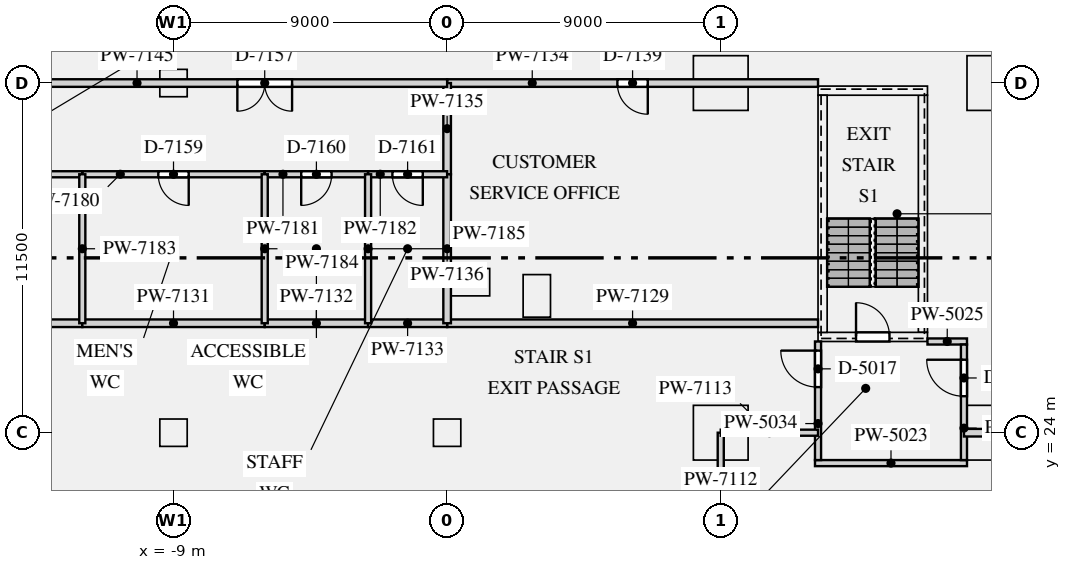
"""IFC4 building model, lengths in metres.
Left out: names, types, materials, properties, quantities, classifications, styles, units other than length and angle.
Written with IfcOpenShell. Run it as: python <this file> out.ifc"""

import sys

from ifc_helpers import new_model, si_unit, direction, frame, frame_2d, origin, origin_2d, place, context, subcontext, project, spatial, rectangle, extrude, element, fill, save


model = new_model("IFC4")
c1 = context("Model", 3, precision=1e-05, world=origin(), true_north=direction((0.0, 1.0)))
c2 = subcontext(c1, "Body", "Model", "MODEL_VIEW")
j1 = project(units=[si_unit("LENGTHUNIT", "METRE"), si_unit("PLANEANGLEUNIT", "RADIAN")], contexts=[c1])
p1 = place(None, origin())
s1 = spatial("IfcSite", under=j1, at=p1, CompositionType="ELEMENT")
p2 = place(p1, origin())
s2 = spatial("IfcBuilding", under=s1, at=p2, CompositionType="ELEMENT")
p3 = place(p2, origin())
s3 = spatial("IfcBuildingStorey", under=s2, at=p3, CompositionType="ELEMENT", Elevation=0.0)
for number, where, z_axis, x_axis in (
    (1, (0.7, 28.95, 0.0), (0.0, 0.0, 1.0), (1.0, 0.0, 0.0)),
    (2, (2.95, 28.5, 0.0), (0.0, 0.0, 1.0), (0.0, -1.0, 0.0)),
):
    element("IfcColumn", number, at=place(p3, frame(where, z_axis=z_axis, x_axis=x_axis)), inside=s3, PredefinedType="USERDEFINED", context=c2, shape_type="SweptSolid", body=[
        extrude(rectangle(XDim=1.4, YDim=0.9, at=origin_2d()), origin(), (0.0, 0.0, 1.0), 6.5),
    ])
for number, where, z_axis, x_axis in (
    (3, (-9.0, 24.0, 0.0), (0.0, 0.0, 1.0), (1.0, 0.0, 0.0)),
    (4, (-9.0, 35.5, 0.0), (0.0, 0.0, 1.0), (1.0, 0.0, 0.0)),
    (5, (0.0, 24.0, 0.0), (0.0, 0.0, 1.0), (1.0, 0.0, 0.0)),
):
    element("IfcColumn", number, at=place(p3, frame(where, z_axis=z_axis, x_axis=x_axis)), inside=s3, PredefinedType="COLUMN", context=c2, shape_type="SweptSolid", body=[
        extrude(rectangle(XDim=0.9, YDim=0.9, at=origin_2d()), origin(), (0.0, 0.0, 1.0), 6.5),
    ])
for number, where, z_axis, x_axis in (
    (6, (9.0, 24.0, 0.0), (0.0, 0.0, 1.0), (1.0, 0.0, 0.0)),
    (7, (9.0, 35.5, 0.0), (0.0, 0.0, 1.0), (1.0, 0.0, 0.0)),
    (8, (18.0, 24.0, 0.0), (0.0, 0.0, 1.0), (1.0, 0.0, 0.0)),
    (9, (18.0, 35.5, 0.0), (0.0, 0.0, 1.0), (1.0, 0.0, 0.0)),
):
    element("IfcColumn", number, at=place(p3, frame(where, z_axis=z_axis, x_axis=x_axis)), inside=s3, PredefinedType="COLUMN", context=c2, shape_type="SweptSolid", body=[
        extrude(rectangle(XDim=1.8, YDim=1.8, at=origin_2d()), origin(), (0.0, 0.0, 1.0), 6.5),
    ])
p4 = place(p3, frame((12.2, 27.15, 0.0), z_axis=(0.0, 0.0, 1.0), x_axis=(1.0, 0.0, 0.0)))
e10 = element("IfcWall", 10, at=p4, inside=s3, PredefinedType="SHEAR", context=c2, shape_type="SweptSolid", body=[
    extrude(rectangle(XDim=3.6, YDim=0.3, at=frame_2d((1.8, 0.0))), origin(), (0.0, 0.0, 1.0), 6.5),
])
p5 = place(p4, frame((1.25, 0.0, 0.0)))
e11 = element("IfcOpeningElement", 11, at=p5, cuts=e10, PredefinedType="OPENING", context=c2, shape_type="SweptSolid", body=[
    extrude(rectangle(XDim=1.1, YDim=2.1, at=frame_2d((0.55, 1.05))), frame((0.0, 0.16, 0.0), z_axis=(0.0, -1.0, 0.0), x_axis=(1.0, 0.0, 0.0)), (0.0, 0.0, 1.0), 0.32),
])
p6 = place(p3, frame((12.2, 35.25, 0.0), z_axis=(0.0, 0.0, 1.0), x_axis=(1.0, 0.0, 0.0)))
e12 = element("IfcWall", 12, at=p6, inside=s3, PredefinedType="SHEAR", context=c2, shape_type="SweptSolid", body=[
    extrude(rectangle(XDim=3.6, YDim=0.3, at=frame_2d((1.8, 0.0))), origin(), (0.0, 0.0, 1.0), 6.5),
])
for number, where, z_axis, x_axis in (
    (13, (12.35, 27.3, 0.0), (0.0, 0.0, 1.0), (0.0, 1.0, 0.0)),
    (14, (15.65, 27.3, 0.0), (0.0, 0.0, 1.0), (0.0, 1.0, 0.0)),
):
    element("IfcWall", number, at=place(p3, frame(where, z_axis=z_axis, x_axis=x_axis)), inside=s3, PredefinedType="SHEAR", context=c2, shape_type="SweptSolid", body=[
        extrude(rectangle(XDim=7.8, YDim=0.3, at=frame_2d((3.9, 0.0))), origin(), (0.0, 0.0, 1.0), 6.5),
    ])
p7 = place(p3, frame((12.1, 23.0, 0.0), z_axis=(0.0, 0.0, 1.0), x_axis=(1.0, 0.0, 0.0)))
e15 = element("IfcWall", 15, at=p7, inside=s3, PredefinedType="PARTITIONING", context=c2, shape_type="SweptSolid", body=[
    extrude(rectangle(XDim=5.0, YDim=0.2, at=frame_2d((2.5, 0.0))), origin(), (0.0, 0.0, 1.0), 6.098),
])
p8 = place(p3, frame((15.8, 27.0, 0.0), z_axis=(0.0, 0.0, 1.0), x_axis=(1.0, 0.0, 0.0)))
e16 = element("IfcWall", 16, at=p8, inside=s3, PredefinedType="PARTITIONING", context=c2, shape_type="SweptSolid", body=[
    extrude(rectangle(XDim=1.3, YDim=0.2, at=frame_2d((0.65, 0.0))), origin(), (0.0, 0.0, 1.0), 6.098),
])
p9 = place(p3, frame((12.2, 23.1, 0.0), z_axis=(0.0, 0.0, 1.0), x_axis=(0.0, 1.0, 0.0)))
e17 = element("IfcWall", 17, at=p9, inside=s3, PredefinedType="PARTITIONING", context=c2, shape_type="SweptSolid", body=[
    extrude(rectangle(XDim=3.9, YDim=0.2, at=frame_2d((1.95, 0.0))), origin(), (0.0, 0.0, 1.0), 6.098),
])
p10 = place(p9, frame((2.4, 0.0, 0.0)))
e18 = element("IfcOpeningElement", 18, at=p10, cuts=e17, PredefinedType="OPENING", context=c2, shape_type="SweptSolid", body=[
    extrude(rectangle(XDim=1.2, YDim=2.1, at=frame_2d((0.6, 1.05))), frame((0.0, 0.11, 0.0), z_axis=(0.0, -1.0, 0.0), x_axis=(1.0, 0.0, 0.0)), (0.0, 0.0, 1.0), 0.22),
])
p11 = place(p3, frame((17.0, 23.1, 0.0), z_axis=(0.0, 0.0, 1.0), x_axis=(0.0, 1.0, 0.0)))
e19 = element("IfcWall", 19, at=p11, inside=s3, PredefinedType="PARTITIONING", context=c2, shape_type="SweptSolid", body=[
    extrude(rectangle(XDim=3.8, YDim=0.2, at=frame_2d((1.9, 0.0))), origin(), (0.0, 0.0, 1.0), 6.098),
])
p12 = place(p11, frame((2.1, 0.0, 0.0)))
e20 = element("IfcOpeningElement", 20, at=p12, cuts=e19, PredefinedType="OPENING", context=c2, shape_type="SweptSolid", body=[
    extrude(rectangle(XDim=1.2, YDim=2.1, at=frame_2d((0.6, 1.05))), frame((0.0, 0.11, 0.0), z_axis=(0.0, -1.0, 0.0), x_axis=(1.0, 0.0, 0.0)), (0.0, 0.0, 1.0), 0.22),
])
p13 = place(p3, frame((9.0, 12.5, 0.0), z_axis=(0.0, 0.0, 1.0), x_axis=(0.0, 1.0, 0.0)))
e21 = element("IfcWall", 21, at=p13, inside=s3, PredefinedType="PARTITIONING", context=c2, shape_type="SweptSolid", body=[
    extrude(rectangle(XDim=11.5, YDim=0.2, at=frame_2d((5.75, 0.0))), origin(), (0.0, 0.0, 1.0), 6.098),
])
p14 = place(p13, frame((4.85, 0.0, 0.0)))
e22 = element("IfcOpeningElement", 22, at=p14, cuts=e21, PredefinedType="OPENING", context=c2, shape_type="SweptSolid", body=[
    extrude(rectangle(XDim=1.8, YDim=2.4, at=frame_2d((0.9, 1.2))), frame((0.0, 0.11, 0.0), z_axis=(0.0, -1.0, 0.0), x_axis=(1.0, 0.0, 0.0)), (0.0, 0.0, 1.0), 0.22),
])
p15 = place(p3, frame((9.0, 24.0, 0.0), z_axis=(0.0, 0.0, 1.0), x_axis=(1.0, 0.0, 0.0)))
e23 = element("IfcWall", 23, at=p15, inside=s3, PredefinedType="PARTITIONING", context=c2, shape_type="SweptSolid", body=[
    extrude(rectangle(XDim=3.2, YDim=0.2, at=frame_2d((1.6, 0.0))), origin(), (0.0, 0.0, 1.0), 6.098),
])
p16 = place(p3, frame((17.0, 24.0, 0.0), z_axis=(0.0, 0.0, 1.0), x_axis=(1.0, 0.0, 0.0)))
e24 = element("IfcWall", 24, at=p16, inside=s3, PredefinedType="PARTITIONING", context=c2, shape_type="SweptSolid", body=[
    extrude(rectangle(XDim=10.0, YDim=0.25, at=frame_2d((5.0, 0.0))), origin(), (0.0, 0.0, 1.0), 6.098),
])
p17 = place(p3, frame((0.0, 27.6, 0.0), z_axis=(0.0, 0.0, 1.0), x_axis=(1.0, 0.0, 0.0)))
e25 = element("IfcWall", 25, at=p17, inside=s3, PredefinedType="PARTITIONING", context=c2, shape_type="SweptSolid", body=[
    extrude(rectangle(XDim=12.2, YDim=0.25, at=frame_2d((6.1, 0.0))), origin(), (0.0, 0.0, 1.0), 6.098),
])
for number, where, z_axis, x_axis in (
    (26, (-18.0, 27.6, 0.0), (0.0, 0.0, 1.0), (1.0, 0.0, 0.0)),
    (27, (-12.0, 27.6, 0.0), (0.0, 0.0, 1.0), (1.0, 0.0, 0.0)),
):
    element("IfcWall", number, at=place(p3, frame(where, z_axis=z_axis, x_axis=x_axis)), inside=s3, PredefinedType="PARTITIONING", context=c2, shape_type="SweptSolid", body=[
        extrude(rectangle(XDim=6.0, YDim=0.25, at=frame_2d((3.0, 0.0))), origin(), (0.0, 0.0, 1.0), 6.098),
    ])
p18 = place(p3, frame((-6.0, 27.6, 0.0), z_axis=(0.0, 0.0, 1.0), x_axis=(1.0, 0.0, 0.0)))
e28 = element("IfcWall", 28, at=p18, inside=s3, PredefinedType="PARTITIONING", context=c2, shape_type="SweptSolid", body=[
    extrude(rectangle(XDim=3.4, YDim=0.25, at=frame_2d((1.7, 0.0))), origin(), (0.0, 0.0, 1.0), 6.098),
])
p19 = place(p3, frame((-2.6, 27.6, 0.0), z_axis=(0.0, 0.0, 1.0), x_axis=(1.0, 0.0, 0.0)))
e29 = element("IfcWall", 29, at=p19, inside=s3, PredefinedType="PARTITIONING", context=c2, shape_type="SweptSolid", body=[
    extrude(rectangle(XDim=2.6, YDim=0.25, at=frame_2d((1.3, 0.0))), origin(), (0.0, 0.0, 1.0), 6.098),
])
p20 = place(p3, frame((0.0, 35.5, 0.0), z_axis=(0.0, 0.0, 1.0), x_axis=(1.0, 0.0, 0.0)))
e30 = element("IfcWall", 30, at=p20, inside=s3, PredefinedType="PARTITIONING", context=c2, shape_type="SweptSolid", body=[
    extrude(rectangle(XDim=12.2, YDim=0.25, at=frame_2d((6.1, 0.0))), origin(), (0.0, 0.0, 1.0), 6.098),
])
p21 = place(p20, frame((5.6, 0.0, 0.0)))
e31 = element("IfcOpeningElement", 31, at=p21, cuts=e30, PredefinedType="OPENING", context=c2, shape_type="SweptSolid", body=[
    extrude(rectangle(XDim=1.0, YDim=2.1, at=frame_2d((0.5, 1.05))), frame((0.0, 0.135, 0.0), z_axis=(0.0, -1.0, 0.0), x_axis=(1.0, 0.0, 0.0)), (0.0, 0.0, 1.0), 0.27),
])
p22 = place(p3, frame((0.0, 32.5, 0.0), z_axis=(0.0, 0.0, 1.0), x_axis=(0.0, 1.0, 0.0)))
e32 = element("IfcWall", 32, at=p22, inside=s3, PredefinedType="PARTITIONING", context=c2, shape_type="SweptSolid", body=[
    extrude(rectangle(XDim=3.0, YDim=0.25, at=frame_2d((1.5, 0.0))), origin(), (0.0, 0.0, 1.0), 6.098),
])
p23 = place(p3, frame((0.0, 27.6, 0.0), z_axis=(0.0, 0.0, 1.0), x_axis=(0.0, 1.0, 0.0)))
e33 = element("IfcWall", 33, at=p23, inside=s3, PredefinedType="PARTITIONING", context=c2, shape_type="SweptSolid", body=[
    extrude(rectangle(XDim=4.9, YDim=0.25, at=frame_2d((2.45, 0.0))), origin(), (0.0, 0.0, 1.0), 6.098),
])
p24 = place(p3, frame((-13.5, 35.5, 0.0), z_axis=(0.0, 0.0, 1.0), x_axis=(1.0, 0.0, 0.0)))
e34 = element("IfcWall", 34, at=p24, inside=s3, PredefinedType="PARTITIONING", context=c2, shape_type="SweptSolid", body=[
    extrude(rectangle(XDim=13.5, YDim=0.25, at=frame_2d((6.75, 0.0))), origin(), (0.0, 0.0, 1.0), 6.098),
])
p25 = place(p24, frame((6.6, 0.0, 0.0)))
e35 = element("IfcOpeningElement", 35, at=p25, cuts=e34, PredefinedType="OPENING", context=c2, shape_type="SweptSolid", body=[
    extrude(rectangle(XDim=1.8, YDim=2.4, at=frame_2d((0.9, 1.2))), frame((0.0, 0.135, 0.0), z_axis=(0.0, -1.0, 0.0), x_axis=(1.0, 0.0, 0.0)), (0.0, 0.0, 1.0), 0.27),
])
p26 = place(p3, frame((-18.0, 32.5, 0.0), z_axis=(0.0, 0.0, 1.0), x_axis=(1.0, 0.0, 0.0)))
e36 = element("IfcWall", 36, at=p26, inside=s3, PredefinedType="PARTITIONING", context=c2, shape_type="SweptSolid", body=[
    extrude(rectangle(XDim=6.0, YDim=0.2, at=frame_2d((3.0, 0.0))), origin(), (0.0, 0.0, 1.0), 6.098),
])
p27 = place(p26, frame((2.5, 0.0, 0.0)))
e37 = element("IfcOpeningElement", 37, at=p27, cuts=e36, PredefinedType="OPENING", context=c2, shape_type="SweptSolid", body=[
    extrude(rectangle(XDim=1.0, YDim=2.1, at=frame_2d((0.5, 1.05))), frame((0.0, 0.11, 0.0), z_axis=(0.0, -1.0, 0.0), x_axis=(1.0, 0.0, 0.0)), (0.0, 0.0, 1.0), 0.22),
])
p28 = place(p3, frame((-12.0, 32.5, 0.0), z_axis=(0.0, 0.0, 1.0), x_axis=(1.0, 0.0, 0.0)))
e38 = element("IfcWall", 38, at=p28, inside=s3, PredefinedType="PARTITIONING", context=c2, shape_type="SweptSolid", body=[
    extrude(rectangle(XDim=6.0, YDim=0.2, at=frame_2d((3.0, 0.0))), origin(), (0.0, 0.0, 1.0), 6.098),
])
p29 = place(p28, frame((2.5, 0.0, 0.0)))
e39 = element("IfcOpeningElement", 39, at=p29, cuts=e38, PredefinedType="OPENING", context=c2, shape_type="SweptSolid", body=[
    extrude(rectangle(XDim=1.0, YDim=2.1, at=frame_2d((0.5, 1.05))), frame((0.0, 0.11, 0.0), z_axis=(0.0, -1.0, 0.0), x_axis=(1.0, 0.0, 0.0)), (0.0, 0.0, 1.0), 0.22),
])
p30 = place(p3, frame((-6.0, 32.5, 0.0), z_axis=(0.0, 0.0, 1.0), x_axis=(1.0, 0.0, 0.0)))
e40 = element("IfcWall", 40, at=p30, inside=s3, PredefinedType="PARTITIONING", context=c2, shape_type="SweptSolid", body=[
    extrude(rectangle(XDim=3.4, YDim=0.2, at=frame_2d((1.7, 0.0))), origin(), (0.0, 0.0, 1.0), 6.098),
])
p31 = place(p30, frame((1.2, 0.0, 0.0)))
e41 = element("IfcOpeningElement", 41, at=p31, cuts=e40, PredefinedType="OPENING", context=c2, shape_type="SweptSolid", body=[
    extrude(rectangle(XDim=1.0, YDim=2.1, at=frame_2d((0.5, 1.05))), frame((0.0, 0.11, 0.0), z_axis=(0.0, -1.0, 0.0), x_axis=(1.0, 0.0, 0.0)), (0.0, 0.0, 1.0), 0.22),
])
p32 = place(p3, frame((-2.6, 32.5, 0.0), z_axis=(0.0, 0.0, 1.0), x_axis=(1.0, 0.0, 0.0)))
e42 = element("IfcWall", 42, at=p32, inside=s3, PredefinedType="PARTITIONING", context=c2, shape_type="SweptSolid", body=[
    extrude(rectangle(XDim=2.6, YDim=0.2, at=frame_2d((1.3, 0.0))), origin(), (0.0, 0.0, 1.0), 6.098),
])
p33 = place(p32, frame((0.8, 0.0, 0.0)))
e43 = element("IfcOpeningElement", 43, at=p33, cuts=e42, PredefinedType="OPENING", context=c2, shape_type="SweptSolid", body=[
    extrude(rectangle(XDim=1.0, YDim=2.1, at=frame_2d((0.5, 1.05))), frame((0.0, 0.11, 0.0), z_axis=(0.0, -1.0, 0.0), x_axis=(1.0, 0.0, 0.0)), (0.0, 0.0, 1.0), 0.22),
])
for number, where, z_axis, x_axis in (
    (44, (-12.0, 27.6, 0.0), (0.0, 0.0, 1.0), (0.0, 1.0, 0.0)),
    (45, (-6.0, 27.6, 0.0), (0.0, 0.0, 1.0), (0.0, 1.0, 0.0)),
    (46, (-2.6, 27.6, 0.0), (0.0, 0.0, 1.0), (0.0, 1.0, 0.0)),
):
    element("IfcWall", number, at=place(p3, frame(where, z_axis=z_axis, x_axis=x_axis)), inside=s3, PredefinedType="PARTITIONING", context=c2, shape_type="SweptSolid", body=[
        extrude(rectangle(XDim=4.9, YDim=0.2, at=frame_2d((2.45, 0.0))), origin(), (0.0, 0.0, 1.0), 6.098),
    ])
p34 = place(p5, origin())
e47 = element("IfcDoor", 47, at=p34, inside=s3, OperationType="SINGLE_SWING_LEFT", PredefinedType="DOOR", context=c2, shape_type="SweptSolid", body=[
    extrude(rectangle(XDim=1.1, YDim=2.1, at=frame_2d((0.55, 1.05))), frame((0.0, 0.025, 0.0), z_axis=(0.0, -1.0, 0.0), x_axis=(1.0, 0.0, 0.0)), (0.0, 0.0, 1.0), 0.05),
])
fill(e11, e47)
p35 = place(p12, origin())
e48 = element("IfcDoor", 48, at=p35, inside=s3, OperationType="SINGLE_SWING_RIGHT", PredefinedType="DOOR", context=c2, shape_type="SweptSolid", body=[
    extrude(rectangle(XDim=1.2, YDim=2.1, at=frame_2d((0.6, 1.05))), frame((0.0, 0.025, 0.0), z_axis=(0.0, -1.0, 0.0), x_axis=(1.0, 0.0, 0.0)), (0.0, 0.0, 1.0), 0.05),
])
fill(e20, e48)
p36 = place(p10, origin())
e49 = element("IfcDoor", 49, at=p36, inside=s3, OperationType="SINGLE_SWING_RIGHT", PredefinedType="DOOR", context=c2, shape_type="SweptSolid", body=[
    extrude(rectangle(XDim=1.2, YDim=2.1, at=frame_2d((0.6, 1.05))), frame((0.0, 0.025, 0.0), z_axis=(0.0, -1.0, 0.0), x_axis=(1.0, 0.0, 0.0)), (0.0, 0.0, 1.0), 0.05),
])
fill(e18, e49)
p37 = place(p21, frame((1.0, 0.0, 0.0), z_axis=(0.0, 0.0, 1.0), x_axis=(-1.0, 0.0, 0.0)))
e50 = element("IfcDoor", 50, at=p37, inside=s3, OperationType="SINGLE_SWING_LEFT", PredefinedType="DOOR", context=c2, shape_type="SweptSolid", body=[
    extrude(rectangle(XDim=1.0, YDim=2.1, at=frame_2d((0.5, 1.05))), frame((0.0, 0.025, 0.0), z_axis=(0.0, -1.0, 0.0), x_axis=(1.0, 0.0, 0.0)), (0.0, 0.0, 1.0), 0.05),
])
fill(e31, e50)
p38 = place(p25, frame((1.8, 0.0, 0.0), z_axis=(0.0, 0.0, 1.0), x_axis=(-1.0, 0.0, 0.0)))
e51 = element("IfcDoor", 51, at=p38, inside=s3, OperationType="DOUBLE_DOOR_SINGLE_SWING", PredefinedType="DOOR", context=c2, shape_type="SweptSolid", body=[
    extrude(rectangle(XDim=1.8, YDim=2.4, at=frame_2d((0.9, 1.2))), frame((0.0, 0.025, 0.0), z_axis=(0.0, -1.0, 0.0), x_axis=(1.0, 0.0, 0.0)), (0.0, 0.0, 1.0), 0.05),
])
fill(e35, e51)
p39 = place(p29, frame((1.0, 0.0, 0.0), z_axis=(0.0, 0.0, 1.0), x_axis=(-1.0, 0.0, 0.0)))
e52 = element("IfcDoor", 52, at=p39, inside=s3, OperationType="SINGLE_SWING_LEFT", PredefinedType="DOOR", context=c2, shape_type="SweptSolid", body=[
    extrude(rectangle(XDim=1.0, YDim=2.1, at=frame_2d((0.5, 1.05))), frame((0.0, 0.025, 0.0), z_axis=(0.0, -1.0, 0.0), x_axis=(1.0, 0.0, 0.0)), (0.0, 0.0, 1.0), 0.05),
])
fill(e39, e52)
p40 = place(p31, frame((1.0, 0.0, 0.0), z_axis=(0.0, 0.0, 1.0), x_axis=(-1.0, 0.0, 0.0)))
e53 = element("IfcDoor", 53, at=p40, inside=s3, OperationType="SINGLE_SWING_RIGHT", PredefinedType="DOOR", context=c2, shape_type="SweptSolid", body=[
    extrude(rectangle(XDim=1.0, YDim=2.1, at=frame_2d((0.5, 1.05))), frame((0.0, 0.025, 0.0), z_axis=(0.0, -1.0, 0.0), x_axis=(1.0, 0.0, 0.0)), (0.0, 0.0, 1.0), 0.05),
])
fill(e41, e53)
p41 = place(p33, frame((1.0, 0.0, 0.0), z_axis=(0.0, 0.0, 1.0), x_axis=(-1.0, 0.0, 0.0)))
e54 = element("IfcDoor", 54, at=p41, inside=s3, OperationType="SINGLE_SWING_LEFT", PredefinedType="DOOR", context=c2, shape_type="SweptSolid", body=[
    extrude(rectangle(XDim=1.0, YDim=2.1, at=frame_2d((0.5, 1.05))), frame((0.0, 0.025, 0.0), z_axis=(0.0, -1.0, 0.0), x_axis=(1.0, 0.0, 0.0)), (0.0, 0.0, 1.0), 0.05),
])
fill(e43, e54)
save(model, sys.argv[1])
